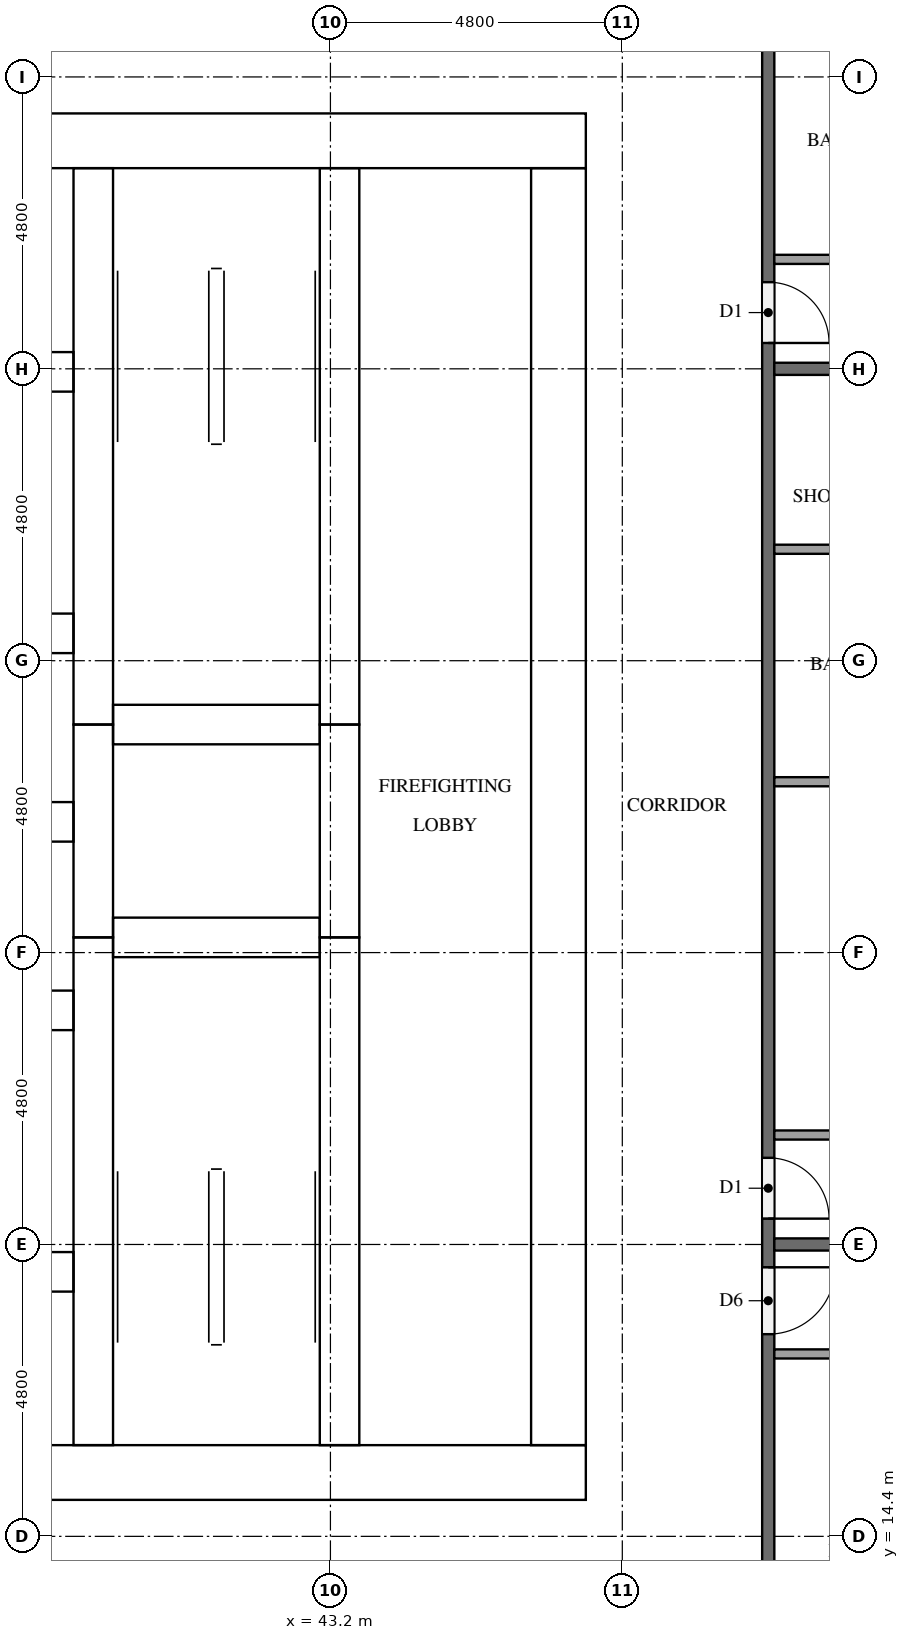
"""IFC4 building model, lengths in metres.
Left out: names, types, materials, properties, quantities, classifications, styles, units other than length and angle.
Written with IfcOpenShell. Run it as: python <this file> out.ifc"""

import sys

from ifc_helpers import new_model, si_unit, direction, frame, frame_2d, origin, place, context, subcontext, project, spatial, rectangle, extrude, element, fill, save


model = new_model("IFC4")
c1 = context("Model", 3, precision=1e-05, world=origin(), true_north=direction((0.0, 1.0)))
c2 = subcontext(c1, "Body", "Model", "MODEL_VIEW")
j1 = project(units=[si_unit("LENGTHUNIT", "METRE"), si_unit("PLANEANGLEUNIT", "RADIAN")], contexts=[c1])
p1 = place(None, origin())
s1 = spatial("IfcSite", under=j1, at=p1, CompositionType="ELEMENT")
p2 = place(p1, origin())
s2 = spatial("IfcBuilding", under=s1, at=p2, CompositionType="ELEMENT")
p3 = place(p2, frame((0.0, 0.0, 73.3)))
s3 = spatial("IfcBuildingStorey", under=s2, at=p3, CompositionType="ELEMENT", Elevation=73.3)
p4 = place(p3, frame((15.0, 15.45, 0.0), z_axis=(0.0, 0.0, 1.0), x_axis=(1.0, 0.0, 0.0)))
e1 = element("IfcWall", 1, at=p4, inside=s3, PredefinedType="SHEAR", context=c2, shape_type="SweptSolid", body=[
    extrude(rectangle(XDim=32.4, YDim=0.9, at=frame_2d((16.2, 0.0))), origin(), (0.0, 0.0, 1.0), 3.2),
])
p5 = place(p4, frame((15.3, 0.0, 0.0)))
e2 = element("IfcOpeningElement", 2, at=p5, cuts=e1, PredefinedType="OPENING", context=c2, shape_type="SweptSolid", body=[
    extrude(rectangle(XDim=1.8, YDim=2.1, at=frame_2d((0.9, 1.05))), frame((0.0, 0.46, 0.0), z_axis=(0.0, -1.0, 0.0), x_axis=(1.0, 0.0, 0.0)), (0.0, 0.0, 1.0), 0.92),
])
p6 = place(p3, frame((15.0, 37.35, 0.0), z_axis=(0.0, 0.0, 1.0), x_axis=(1.0, 0.0, 0.0)))
e3 = element("IfcWall", 3, at=p6, inside=s3, PredefinedType="SHEAR", context=c2, shape_type="SweptSolid", body=[
    extrude(rectangle(XDim=32.4, YDim=0.9, at=frame_2d((16.2, 0.0))), origin(), (0.0, 0.0, 1.0), 3.2),
])
p7 = place(p6, frame((15.3, 0.0, 0.0)))
e4 = element("IfcOpeningElement", 4, at=p7, cuts=e3, PredefinedType="OPENING", context=c2, shape_type="SweptSolid", body=[
    extrude(rectangle(XDim=1.8, YDim=2.1, at=frame_2d((0.9, 1.05))), frame((0.0, 0.46, 0.0), z_axis=(0.0, -1.0, 0.0), x_axis=(1.0, 0.0, 0.0)), (0.0, 0.0, 1.0), 0.92),
])
p8 = place(p6, frame((1.794, 0.0, 0.0)))
e5 = element("IfcOpeningElement", 5, at=p8, cuts=e3, PredefinedType="OPENING", context=c2, shape_type="SweptSolid", body=[
    extrude(rectangle(XDim=1.0, YDim=2.1, at=frame_2d((0.5, 1.05))), frame((0.0, 0.46, 0.0), z_axis=(0.0, -1.0, 0.0), x_axis=(1.0, 0.0, 0.0)), (0.0, 0.0, 1.0), 0.92),
])
p9 = place(p6, frame((5.331, 0.0, 0.0)))
e6 = element("IfcOpeningElement", 6, at=p9, cuts=e3, PredefinedType="OPENING", context=c2, shape_type="SweptSolid", body=[
    extrude(rectangle(XDim=1.0, YDim=2.1, at=frame_2d((0.5, 1.05))), frame((0.0, 0.46, 0.0), z_axis=(0.0, -1.0, 0.0), x_axis=(1.0, 0.0, 0.0)), (0.0, 0.0, 1.0), 0.92),
])
p10 = place(p3, frame((46.95, 15.9, 0.0), z_axis=(0.0, 0.0, 1.0), x_axis=(0.0, 1.0, 0.0)))
e7 = element("IfcWall", 7, at=p10, inside=s3, PredefinedType="SHEAR", context=c2, shape_type="SweptSolid", body=[
    extrude(rectangle(XDim=21.0, YDim=0.9, at=frame_2d((10.5, 0.0))), origin(), (0.0, 0.0, 1.0), 3.2),
])
p11 = place(p10, frame((10.2, 0.0, 0.0)))
e8 = element("IfcOpeningElement", 8, at=p11, cuts=e7, PredefinedType="OPENING", context=c2, shape_type="SweptSolid", body=[
    extrude(rectangle(XDim=1.2, YDim=2.1, at=frame_2d((0.6, 1.05))), frame((0.0, 0.46, 0.0), z_axis=(0.0, -1.0, 0.0), x_axis=(1.0, 0.0, 0.0)), (0.0, 0.0, 1.0), 0.92),
])
p12 = place(p3, frame((39.3, 15.9, 0.0), z_axis=(0.0, 0.0, 1.0), x_axis=(0.0, 1.0, 0.0)))
e9 = element("IfcWall", 9, at=p12, inside=s3, PredefinedType="SHEAR", context=c2, shape_type="SweptSolid", body=[
    extrude(rectangle(XDim=8.35, YDim=0.65, at=frame_2d((4.175, 0.0))), origin(), (0.0, 0.0, 1.0), 3.2),
])
p13 = place(p3, frame((39.3, 24.25, 0.0), z_axis=(0.0, 0.0, 1.0), x_axis=(0.0, 1.0, 0.0)))
e10 = element("IfcWall", 10, at=p13, inside=s3, PredefinedType="SHEAR", context=c2, shape_type="SweptSolid", body=[
    extrude(rectangle(XDim=3.5, YDim=0.65, at=frame_2d((1.75, 0.0))), origin(), (0.0, 0.0, 1.0), 3.2),
])
p14 = place(p3, frame((39.3, 27.75, 0.0), z_axis=(0.0, 0.0, 1.0), x_axis=(0.0, 1.0, 0.0)))
e11 = element("IfcWall", 11, at=p14, inside=s3, PredefinedType="SHEAR", context=c2, shape_type="SweptSolid", body=[
    extrude(rectangle(XDim=9.15, YDim=0.65, at=frame_2d((4.575, 0.0))), origin(), (0.0, 0.0, 1.0), 3.2),
])
p15 = place(p3, frame((43.35, 15.9, 0.0), z_axis=(0.0, 0.0, 1.0), x_axis=(0.0, 1.0, 0.0)))
e12 = element("IfcWall", 12, at=p15, inside=s3, PredefinedType="SHEAR", context=c2, shape_type="SweptSolid", body=[
    extrude(rectangle(XDim=8.35, YDim=0.65, at=frame_2d((4.175, 0.0))), origin(), (0.0, 0.0, 1.0), 3.2),
])
p16 = place(p15, frame((0.3, 0.0, 0.0)))
e13 = element("IfcOpeningElement", 13, at=p16, cuts=e12, PredefinedType="OPENING", context=c2, shape_type="SweptSolid", body=[
    extrude(rectangle(XDim=1.2, YDim=2.1, at=frame_2d((0.6, 1.05))), frame((0.0, 0.335, 0.0), z_axis=(0.0, -1.0, 0.0), x_axis=(1.0, 0.0, 0.0)), (0.0, 0.0, 1.0), 0.67),
])
p17 = place(p3, frame((43.35, 24.25, 0.0), z_axis=(0.0, 0.0, 1.0), x_axis=(0.0, 1.0, 0.0)))
e14 = element("IfcWall", 14, at=p17, inside=s3, PredefinedType="SHEAR", context=c2, shape_type="SweptSolid", body=[
    extrude(rectangle(XDim=3.5, YDim=0.65, at=frame_2d((1.75, 0.0))), origin(), (0.0, 0.0, 1.0), 3.2),
])
p18 = place(p17, frame((1.2, 0.0, 0.0)))
e15 = element("IfcOpeningElement", 15, at=p18, cuts=e14, PredefinedType="OPENING", context=c2, shape_type="SweptSolid", body=[
    extrude(rectangle(XDim=1.1, YDim=2.1, at=frame_2d((0.55, 1.05))), frame((0.0, 0.335, 0.0), z_axis=(0.0, -1.0, 0.0), x_axis=(1.0, 0.0, 0.0)), (0.0, 0.0, 1.0), 0.67),
])
p19 = place(p3, frame((43.35, 27.75, 0.0), z_axis=(0.0, 0.0, 1.0), x_axis=(0.0, 1.0, 0.0)))
e16 = element("IfcWall", 16, at=p19, inside=s3, PredefinedType="SHEAR", context=c2, shape_type="SweptSolid", body=[
    extrude(rectangle(XDim=9.15, YDim=0.65, at=frame_2d((4.575, 0.0))), origin(), (0.0, 0.0, 1.0), 3.2),
])
p20 = place(p19, frame((7.65, 0.0, 0.0)))
e17 = element("IfcOpeningElement", 17, at=p20, cuts=e16, PredefinedType="OPENING", context=c2, shape_type="SweptSolid", body=[
    extrude(rectangle(XDim=1.2, YDim=2.1, at=frame_2d((0.6, 1.05))), frame((0.0, 0.335, 0.0), z_axis=(0.0, -1.0, 0.0), x_axis=(1.0, 0.0, 0.0)), (0.0, 0.0, 1.0), 0.67),
])
for number, where, z_axis, x_axis in (
    (18, (39.625, 24.25, 0.0), (0.0, 0.0, 1.0), (1.0, 0.0, 0.0)),
    (19, (39.625, 27.75, 0.0), (0.0, 0.0, 1.0), (1.0, 0.0, 0.0)),
):
    element("IfcWall", number, at=place(p3, frame(where, z_axis=z_axis, x_axis=x_axis)), inside=s3, PredefinedType="SHEAR", context=c2, shape_type="SweptSolid", body=[
        extrude(rectangle(XDim=3.4, YDim=0.65, at=frame_2d((1.7, 0.0))), origin(), (0.0, 0.0, 1.0), 3.2),
    ])
p21 = place(p3, frame((33.375, 18.75, 0.0), z_axis=(0.0, 0.0, 1.0), x_axis=(1.0, 0.0, 0.0)))
e20 = element("IfcWall", 20, at=p21, inside=s3, PredefinedType="SHEAR", context=c2, shape_type="SweptSolid", body=[
    extrude(rectangle(XDim=5.6, YDim=0.65, at=frame_2d((2.8, 0.0))), origin(), (0.0, 0.0, 1.0), 3.2),
])
p22 = place(p21, frame((1.288, 0.0, 0.0)))
e21 = element("IfcOpeningElement", 21, at=p22, cuts=e20, PredefinedType="OPENING", context=c2, shape_type="SweptSolid", body=[
    extrude(rectangle(XDim=1.1, YDim=2.1, at=frame_2d((0.55, 1.05))), frame((0.0, 0.335, 0.0), z_axis=(0.0, -1.0, 0.0), x_axis=(1.0, 0.0, 0.0)), (0.0, 0.0, 1.0), 0.67),
])
p23 = place(p21, frame((3.863, 0.0, 0.0)))
e22 = element("IfcOpeningElement", 22, at=p23, cuts=e20, PredefinedType="OPENING", context=c2, shape_type="SweptSolid", body=[
    extrude(rectangle(XDim=1.1, YDim=2.1, at=frame_2d((0.55, 1.05))), frame((0.0, 0.335, 0.0), z_axis=(0.0, -1.0, 0.0), x_axis=(1.0, 0.0, 0.0)), (0.0, 0.0, 1.0), 0.67),
])
p24 = place(p3, frame((23.425, 23.05, 0.0), z_axis=(0.0, 0.0, 1.0), x_axis=(1.0, 0.0, 0.0)))
e23 = element("IfcWall", 23, at=p24, inside=s3, PredefinedType="SHEAR", context=c2, shape_type="SweptSolid", body=[
    extrude(rectangle(XDim=15.55, YDim=0.65, at=frame_2d((7.775, 0.0))), origin(), (0.0, 0.0, 1.0), 3.2),
])
p25 = place(p24, frame((0.663, 0.0, 0.0)))
e24 = element("IfcOpeningElement", 24, at=p25, cuts=e23, PredefinedType="OPENING", context=c2, shape_type="SweptSolid", body=[
    extrude(rectangle(XDim=1.1, YDim=2.1, at=frame_2d((0.55, 1.05))), frame((0.0, 0.335, 0.0), z_axis=(0.0, -1.0, 0.0), x_axis=(1.0, 0.0, 0.0)), (0.0, 0.0, 1.0), 0.67),
])
p26 = place(p24, frame((3.288, 0.0, 0.0)))
e25 = element("IfcOpeningElement", 25, at=p26, cuts=e23, PredefinedType="OPENING", context=c2, shape_type="SweptSolid", body=[
    extrude(rectangle(XDim=1.1, YDim=2.1, at=frame_2d((0.55, 1.05))), frame((0.0, 0.335, 0.0), z_axis=(0.0, -1.0, 0.0), x_axis=(1.0, 0.0, 0.0)), (0.0, 0.0, 1.0), 0.67),
])
p27 = place(p24, frame((12.525, 0.0, 0.0)))
e26 = element("IfcOpeningElement", 26, at=p27, cuts=e23, PredefinedType="OPENING", context=c2, shape_type="SweptSolid", body=[
    extrude(rectangle(XDim=1.0, YDim=2.1, at=frame_2d((0.5, 1.05))), frame((0.0, 0.335, 0.0), z_axis=(0.0, -1.0, 0.0), x_axis=(1.0, 0.0, 0.0)), (0.0, 0.0, 1.0), 0.67),
])
p28 = place(p3, frame((23.425, 26.15, 0.0), z_axis=(0.0, 0.0, 1.0), x_axis=(1.0, 0.0, 0.0)))
e27 = element("IfcWall", 27, at=p28, inside=s3, PredefinedType="SHEAR", context=c2, shape_type="SweptSolid", body=[
    extrude(rectangle(XDim=15.55, YDim=0.65, at=frame_2d((7.775, 0.0))), origin(), (0.0, 0.0, 1.0), 3.2),
])
p29 = place(p3, frame((23.425, 29.25, 0.0), z_axis=(0.0, 0.0, 1.0), x_axis=(1.0, 0.0, 0.0)))
e28 = element("IfcWall", 28, at=p29, inside=s3, PredefinedType="SHEAR", context=c2, shape_type="SweptSolid", body=[
    extrude(rectangle(XDim=15.55, YDim=0.65, at=frame_2d((7.775, 0.0))), origin(), (0.0, 0.0, 1.0), 3.2),
])
p30 = place(p29, frame((3.337, 0.0, 0.0)))
e29 = element("IfcOpeningElement", 29, at=p30, cuts=e28, PredefinedType="OPENING", context=c2, shape_type="SweptSolid", body=[
    extrude(rectangle(XDim=1.0, YDim=2.1, at=frame_2d((0.5, 1.05))), frame((0.0, 0.335, 0.0), z_axis=(0.0, -1.0, 0.0), x_axis=(1.0, 0.0, 0.0)), (0.0, 0.0, 1.0), 0.67),
])
p31 = place(p29, frame((11.212, 0.0, 0.0)))
e30 = element("IfcOpeningElement", 30, at=p31, cuts=e28, PredefinedType="OPENING", context=c2, shape_type="SweptSolid", body=[
    extrude(rectangle(XDim=1.0, YDim=2.1, at=frame_2d((0.5, 1.05))), frame((0.0, 0.335, 0.0), z_axis=(0.0, -1.0, 0.0), x_axis=(1.0, 0.0, 0.0)), (0.0, 0.0, 1.0), 0.67),
])
p32 = place(p3, frame((33.375, 33.55, 0.0), z_axis=(0.0, 0.0, 1.0), x_axis=(1.0, 0.0, 0.0)))
e31 = element("IfcWall", 31, at=p32, inside=s3, PredefinedType="SHEAR", context=c2, shape_type="SweptSolid", body=[
    extrude(rectangle(XDim=5.6, YDim=0.65, at=frame_2d((2.8, 0.0))), origin(), (0.0, 0.0, 1.0), 3.2),
])
p33 = place(p3, frame((50.4, 40.7, 0.0), z_axis=(0.0, 0.0, 1.0), x_axis=(0.0, -1.0, 0.0)))
e32 = element("IfcWall", 32, at=p33, inside=s3, PredefinedType="PARTITIONING", context=c2, shape_type="SweptSolid", body=[
    extrude(rectangle(XDim=28.6, YDim=0.2, at=frame_2d((14.3, 0.0))), origin(), (0.0, 0.0, 1.0), 3.2),
])
p34 = place(p33, frame((21.875, 0.0, 0.0)))
e33 = element("IfcOpeningElement", 33, at=p34, cuts=e32, PredefinedType="OPENING", context=c2, shape_type="SweptSolid", body=[
    extrude(rectangle(XDim=1.1, YDim=2.1, at=frame_2d((0.55, 1.05))), frame((0.0, 0.11, 0.0), z_axis=(0.0, -1.0, 0.0), x_axis=(1.0, 0.0, 0.0)), (0.0, 0.0, 1.0), 0.22),
])
p35 = place(p33, frame((20.075, 0.0, 0.0)))
e34 = element("IfcOpeningElement", 34, at=p35, cuts=e32, PredefinedType="OPENING", context=c2, shape_type="SweptSolid", body=[
    extrude(rectangle(XDim=1.0, YDim=2.1, at=frame_2d((0.5, 1.05))), frame((0.0, 0.11, 0.0), z_axis=(0.0, -1.0, 0.0), x_axis=(1.0, 0.0, 0.0)), (0.0, 0.0, 1.0), 0.22),
])
p36 = place(p33, frame((5.675, 0.0, 0.0)))
e35 = element("IfcOpeningElement", 35, at=p36, cuts=e32, PredefinedType="OPENING", context=c2, shape_type="SweptSolid", body=[
    extrude(rectangle(XDim=1.0, YDim=2.1, at=frame_2d((0.5, 1.05))), frame((0.0, 0.11, 0.0), z_axis=(0.0, -1.0, 0.0), x_axis=(1.0, 0.0, 0.0)), (0.0, 0.0, 1.0), 0.22),
])
p37 = place(p3, frame((50.5, 19.2, 0.0), z_axis=(0.0, 0.0, 1.0), x_axis=(1.0, 0.0, 0.0)))
e36 = element("IfcWall", 36, at=p37, inside=s3, PredefinedType="PARTITIONING", context=c2, shape_type="SweptSolid", body=[
    extrude(rectangle(XDim=11.8, YDim=0.2, at=frame_2d((5.9, 0.0))), origin(), (0.0, 0.0, 1.0), 3.2),
])
p38 = place(p3, frame((50.5, 33.6, 0.0), z_axis=(0.0, 0.0, 1.0), x_axis=(1.0, 0.0, 0.0)))
e37 = element("IfcWall", 37, at=p38, inside=s3, PredefinedType="PARTITIONING", context=c2, shape_type="SweptSolid", body=[
    extrude(rectangle(XDim=11.475, YDim=0.2, at=frame_2d((5.738, 0.0))), origin(), (0.0, 0.0, 1.0), 3.2),
])
p39 = place(p3, frame((50.5, 17.4, 0.0), z_axis=(0.0, 0.0, 1.0), x_axis=(1.0, 0.0, 0.0)))
e38 = element("IfcWall", 38, at=p39, inside=s3, PredefinedType="PARTITIONING", context=c2, shape_type="SweptSolid", body=[
    extrude(rectangle(XDim=4.025, YDim=0.15, at=frame_2d((2.012, 0.0))), origin(), (0.0, 0.0, 1.0), 3.2),
])
for number, where, z_axis, x_axis in (
    (39, (50.5, 26.81, 0.0), (0.0, 0.0, 1.0), (1.0, 0.0, 0.0)),
    (40, (50.5, 30.633, 0.0), (0.0, 0.0, 1.0), (1.0, 0.0, 0.0)),
):
    element("IfcWall", number, at=place(p3, frame(where, z_axis=z_axis, x_axis=x_axis)), inside=s3, PredefinedType="PARTITIONING", context=c2, shape_type="SweptSolid", body=[
        extrude(rectangle(XDim=4.325, YDim=0.15, at=frame_2d((2.163, 0.0))), origin(), (0.0, 0.0, 1.0), 3.2),
    ])
p40 = place(p3, frame((50.5, 21.0, 0.0), z_axis=(0.0, 0.0, 1.0), x_axis=(1.0, 0.0, 0.0)))
e41 = element("IfcWall", 41, at=p40, inside=s3, PredefinedType="PARTITIONING", context=c2, shape_type="SweptSolid", body=[
    extrude(rectangle(XDim=4.475, YDim=0.15, at=frame_2d((2.238, 0.0))), origin(), (0.0, 0.0, 1.0), 3.2),
])
p41 = place(p3, frame((50.5, 35.4, 0.0), z_axis=(0.0, 0.0, 1.0), x_axis=(1.0, 0.0, 0.0)))
e42 = element("IfcWall", 42, at=p41, inside=s3, PredefinedType="PARTITIONING", context=c2, shape_type="SweptSolid", body=[
    extrude(rectangle(XDim=3.725, YDim=0.15, at=frame_2d((1.863, 0.0))), origin(), (0.0, 0.0, 1.0), 3.2),
])
p42 = place(p18, origin())
e43 = element("IfcDoor", 43, at=p42, inside=s3, OperationType="DOUBLE_DOOR_SLIDING", PredefinedType="DOOR", context=c2, shape_type="SweptSolid", body=[
    extrude(rectangle(XDim=1.1, YDim=2.1, at=frame_2d((0.55, 1.05))), frame((0.0, 0.025, 0.0), z_axis=(0.0, -1.0, 0.0), x_axis=(1.0, 0.0, 0.0)), (0.0, 0.0, 1.0), 0.05),
])
fill(e15, e43)
p43 = place(p16, origin())
e44 = element("IfcDoor", 44, at=p43, inside=s3, OperationType="SINGLE_SWING_LEFT", PredefinedType="DOOR", context=c2, shape_type="SweptSolid", body=[
    extrude(rectangle(XDim=1.2, YDim=2.1, at=frame_2d((0.6, 1.05))), frame((0.0, 0.025, 0.0), z_axis=(0.0, -1.0, 0.0), x_axis=(1.0, 0.0, 0.0)), (0.0, 0.0, 1.0), 0.05),
])
fill(e13, e44)
p44 = place(p20, origin())
e45 = element("IfcDoor", 45, at=p44, inside=s3, OperationType="SINGLE_SWING_RIGHT", PredefinedType="DOOR", context=c2, shape_type="SweptSolid", body=[
    extrude(rectangle(XDim=1.2, YDim=2.1, at=frame_2d((0.6, 1.05))), frame((0.0, 0.025, 0.0), z_axis=(0.0, -1.0, 0.0), x_axis=(1.0, 0.0, 0.0)), (0.0, 0.0, 1.0), 0.05),
])
fill(e17, e45)
p45 = place(p11, origin())
e46 = element("IfcDoor", 46, at=p45, inside=s3, OperationType="SINGLE_SWING_RIGHT", PredefinedType="DOOR", context=c2, shape_type="SweptSolid", body=[
    extrude(rectangle(XDim=1.2, YDim=2.1, at=frame_2d((0.6, 1.05))), frame((0.0, 0.025, 0.0), z_axis=(0.0, -1.0, 0.0), x_axis=(1.0, 0.0, 0.0)), (0.0, 0.0, 1.0), 0.05),
])
fill(e8, e46)
p46 = place(p34, origin())
e47 = element("IfcDoor", 47, at=p46, inside=s3, OperationType="SINGLE_SWING_LEFT", PredefinedType="DOOR", context=c2, shape_type="SweptSolid", body=[
    extrude(rectangle(XDim=1.1, YDim=2.1, at=frame_2d((0.55, 1.05))), frame((0.0, 0.025, 0.0), z_axis=(0.0, -1.0, 0.0), x_axis=(1.0, 0.0, 0.0)), (0.0, 0.0, 1.0), 0.05),
])
fill(e33, e47)
p47 = place(p35, origin())
e48 = element("IfcDoor", 48, at=p47, inside=s3, OperationType="SINGLE_SWING_RIGHT", PredefinedType="DOOR", context=c2, shape_type="SweptSolid", body=[
    extrude(rectangle(XDim=1.0, YDim=2.1, at=frame_2d((0.5, 1.05))), frame((0.0, 0.025, 0.0), z_axis=(0.0, -1.0, 0.0), x_axis=(1.0, 0.0, 0.0)), (0.0, 0.0, 1.0), 0.05),
])
fill(e34, e48)
p48 = place(p36, origin())
e49 = element("IfcDoor", 49, at=p48, inside=s3, OperationType="SINGLE_SWING_RIGHT", PredefinedType="DOOR", context=c2, shape_type="SweptSolid", body=[
    extrude(rectangle(XDim=1.0, YDim=2.1, at=frame_2d((0.5, 1.05))), frame((0.0, 0.025, 0.0), z_axis=(0.0, -1.0, 0.0), x_axis=(1.0, 0.0, 0.0)), (0.0, 0.0, 1.0), 0.05),
])
fill(e35, e49)
save(model, sys.argv[1])
